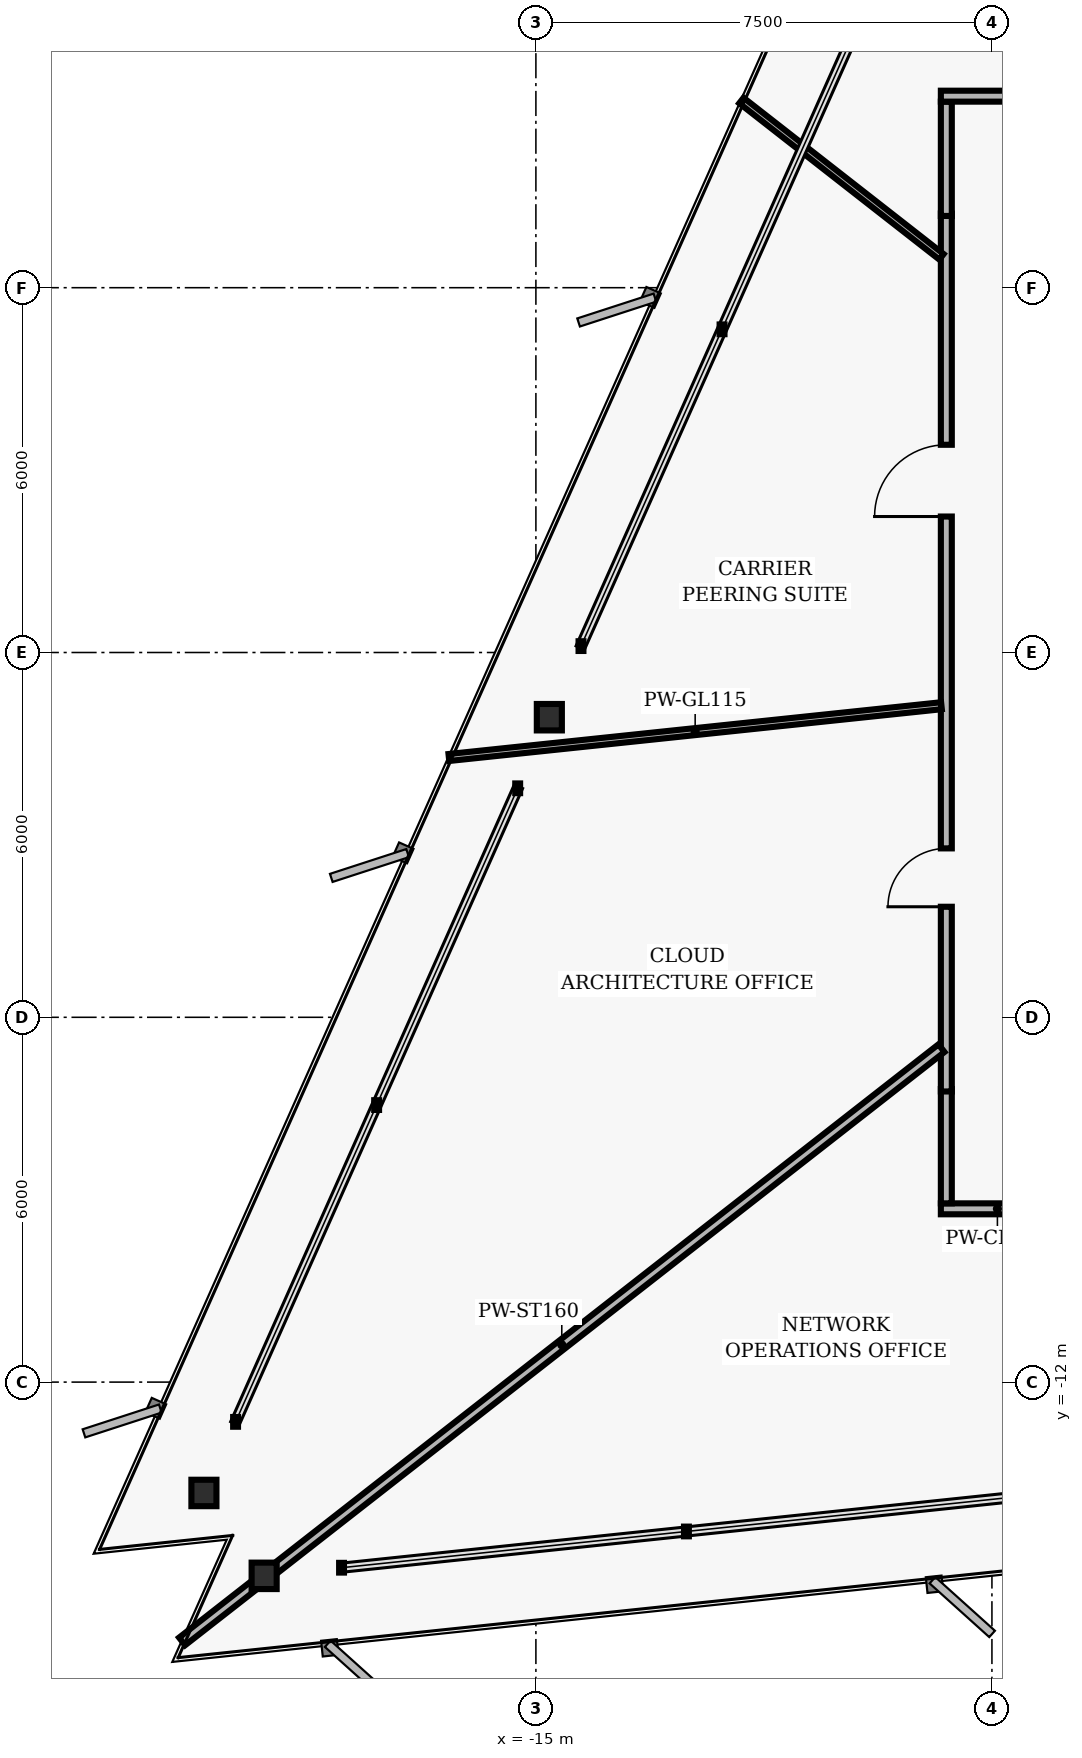
"""IFC4 building model, lengths in metres.
Left out: names, types, materials, properties, quantities, classifications, styles, units other than length and angle.
Written with IfcOpenShell. Run it as: python <this file> out.ifc"""

import sys

from ifc_helpers import new_model, si_unit, direction, frame, frame_2d, origin, origin_2d, place, context, subcontext, project, spatial, rectangle, i_section, extrude, element, fill, save


model = new_model("IFC4")
c1 = context("Model", 3, precision=1e-05, world=origin(), true_north=direction((0.0, 1.0)))
c2 = subcontext(c1, "Body", "Model", "MODEL_VIEW")
j1 = project(units=[si_unit("LENGTHUNIT", "METRE"), si_unit("PLANEANGLEUNIT", "RADIAN")], contexts=[c1])
p1 = place(None, origin())
s1 = spatial("IfcSite", under=j1, at=p1, CompositionType="ELEMENT")
p2 = place(p1, origin())
s2 = spatial("IfcBuilding", under=s1, at=p2, CompositionType="ELEMENT")
p3 = place(p2, frame((0.0, 0.0, 107.68)))
s3 = spatial("IfcBuildingStorey", under=s2, at=p3, CompositionType="ELEMENT", Elevation=107.68)
for number, where, z_axis, x_axis in (
    (1, (-14.779, -1.064, 0.0), (0.0, 0.0, 1.0), (1.0, 0.0, 0.0)),
    (2, (-20.46, -13.823, 0.0), (0.0, 0.0, 1.0), (1.0, 0.0, 0.0)),
    (3, (-19.469, -15.187, 0.0), (0.0, 0.0, 1.0), (1.0, 0.0, 0.0)),
):
    element("IfcColumn", number, at=place(p3, frame(where, z_axis=z_axis, x_axis=x_axis)), inside=s3, PredefinedType="COLUMN", context=c2, shape_type="SweptSolid", body=[
        extrude(i_section(OverallWidth=0.412, OverallDepth=0.435, WebThickness=0.036, FlangeThickness=0.057, FilletRadius=0.022, at=origin_2d()), origin(), (0.0, 0.0, 1.0), 3.04),
    ])
p4 = place(p3, frame((-6.48, -9.15, 0.0), z_axis=(0.0, 0.0, 1.0), x_axis=(-1.0, 0.0, 0.0)))
e4 = element("IfcWall", 4, at=p4, inside=s3, PredefinedType="PARTITIONING", context=c2, shape_type="SweptSolid", body=[
    extrude(rectangle(XDim=1.86, YDim=0.18, at=frame_2d((0.93, 0.0))), origin(), (0.0, 0.0, 1.0), 2.33),
])
p5 = place(p3, frame((-8.25, -9.06, 0.0), z_axis=(0.0, 0.0, 1.0), x_axis=(0.0, 1.0, 0.0)))
e5 = element("IfcWall", 5, at=p5, inside=s3, PredefinedType="PARTITIONING", context=c2, shape_type="SweptSolid", body=[
    extrude(rectangle(XDim=1.88, YDim=0.18, at=frame_2d((0.94, 0.0))), origin(), (0.0, 0.0, 1.0), 2.763),
])
p6 = place(p3, frame((-8.25, -7.22, 0.0), z_axis=(0.0, 0.0, 1.0), x_axis=(0.0, 1.0, 0.0)))
e6 = element("IfcWall", 6, at=p6, inside=s3, PredefinedType="PARTITIONING", context=c2, shape_type="SweptSolid", body=[
    extrude(rectangle(XDim=14.44, YDim=0.18, at=frame_2d((7.22, 0.0))), origin(), (0.0, 0.0, 1.0), 2.33),
])
p7 = place(p6, frame((3.038, 0.0, 0.0)))
e7 = element("IfcOpeningElement", 7, at=p7, cuts=e6, PredefinedType="OPENING", context=c2, shape_type="SweptSolid", body=[
    extrude(rectangle(XDim=0.96, YDim=2.02, at=frame_2d((0.48, 1.01))), frame((0.0, 0.1, 0.0), z_axis=(0.0, -1.0, 0.0), x_axis=(1.0, 0.0, 0.0)), (0.0, 0.0, 1.0), 0.2),
])
p8 = place(p6, frame((9.456, 0.0, 0.0)))
e8 = element("IfcOpeningElement", 8, at=p8, cuts=e6, PredefinedType="OPENING", context=c2, shape_type="SweptSolid", body=[
    extrude(rectangle(XDim=1.18, YDim=2.02, at=frame_2d((0.59, 1.01))), frame((0.0, 0.1, 0.0), z_axis=(0.0, -1.0, 0.0), x_axis=(1.0, 0.0, 0.0)), (0.0, 0.0, 1.0), 0.2),
])
p9 = place(p3, frame((-8.25, 7.18, 0.0), z_axis=(0.0, 0.0, 1.0), x_axis=(0.0, 1.0, 0.0)))
e9 = element("IfcWall", 9, at=p9, inside=s3, PredefinedType="PARTITIONING", context=c2, shape_type="SweptSolid", body=[
    extrude(rectangle(XDim=1.88, YDim=0.18, at=frame_2d((0.94, 0.0))), origin(), (0.0, 0.0, 1.0), 2.763),
])
p10 = place(p3, frame((-8.34, 9.15, 0.0), z_axis=(0.0, 0.0, 1.0), x_axis=(1.0, 0.0, 0.0)))
e10 = element("IfcWall", 10, at=p10, inside=s3, PredefinedType="PARTITIONING", context=c2, shape_type="SweptSolid", body=[
    extrude(rectangle(XDim=1.86, YDim=0.18, at=frame_2d((0.93, 0.0))), origin(), (0.0, 0.0, 1.0), 2.763),
])
p11 = place(p3, frame((-8.33, -0.875, 0.0), z_axis=(0.0, 0.0, 1.0), x_axis=(-0.994520879121, -0.104538131765, 0.0)))
e11 = element("IfcWall", 11, at=p11, inside=s3, PredefinedType="MOVABLE", context=c2, shape_type="SweptSolid", body=[
    extrude(rectangle(XDim=8.146, YDim=0.115, at=frame_2d((4.073, 0.0))), origin(), (0.0, 0.0, 1.0), 2.763),
])
p12 = place(p3, frame((-8.33, -6.508, 0.0), z_axis=(0.0, 0.0, 1.0), x_axis=(-0.788011528275, -0.615660483794, 0.0)))
e12 = element("IfcWall", 12, at=p12, inside=s3, PredefinedType="PARTITIONING", context=c2, shape_type="SweptSolid", body=[
    extrude(rectangle(XDim=15.848, YDim=0.16, at=frame_2d((7.924, 0.0))), origin(), (0.0, 0.0, 1.0), 2.132),
])
p13 = place(p3, frame((-8.33, 6.508, 0.0), z_axis=(0.0, 0.0, 1.0), x_axis=(-0.787993347372, 0.615683753641, 0.0)))
e13 = element("IfcWall", 13, at=p13, inside=s3, PredefinedType="MOVABLE", context=c2, shape_type="SweptSolid", body=[
    extrude(rectangle(XDim=4.176, YDim=0.115, at=frame_2d((2.088, 0.0))), origin(), (0.0, 0.0, 1.0), 2.763),
])
p14 = place(p7, origin())
e14 = element("IfcDoor", 14, at=p14, inside=s3, OperationType="SINGLE_SWING_LEFT", PredefinedType="DOOR", context=c2, shape_type="SweptSolid", body=[
    extrude(rectangle(XDim=0.96, YDim=2.02, at=frame_2d((0.48, 1.01))), frame((0.0, 0.025, 0.0), z_axis=(0.0, -1.0, 0.0), x_axis=(1.0, 0.0, 0.0)), (0.0, 0.0, 1.0), 0.05),
])
fill(e7, e14)
p15 = place(p8, origin())
e15 = element("IfcDoor", 15, at=p15, inside=s3, OperationType="SINGLE_SWING_LEFT", PredefinedType="DOOR", context=c2, shape_type="SweptSolid", body=[
    extrude(rectangle(XDim=1.18, YDim=2.02, at=frame_2d((0.59, 1.01))), frame((0.0, 0.025, 0.0), z_axis=(0.0, -1.0, 0.0), x_axis=(1.0, 0.0, 0.0)), (0.0, 0.0, 1.0), 0.05),
])
fill(e8, e15)
save(model, sys.argv[1])
